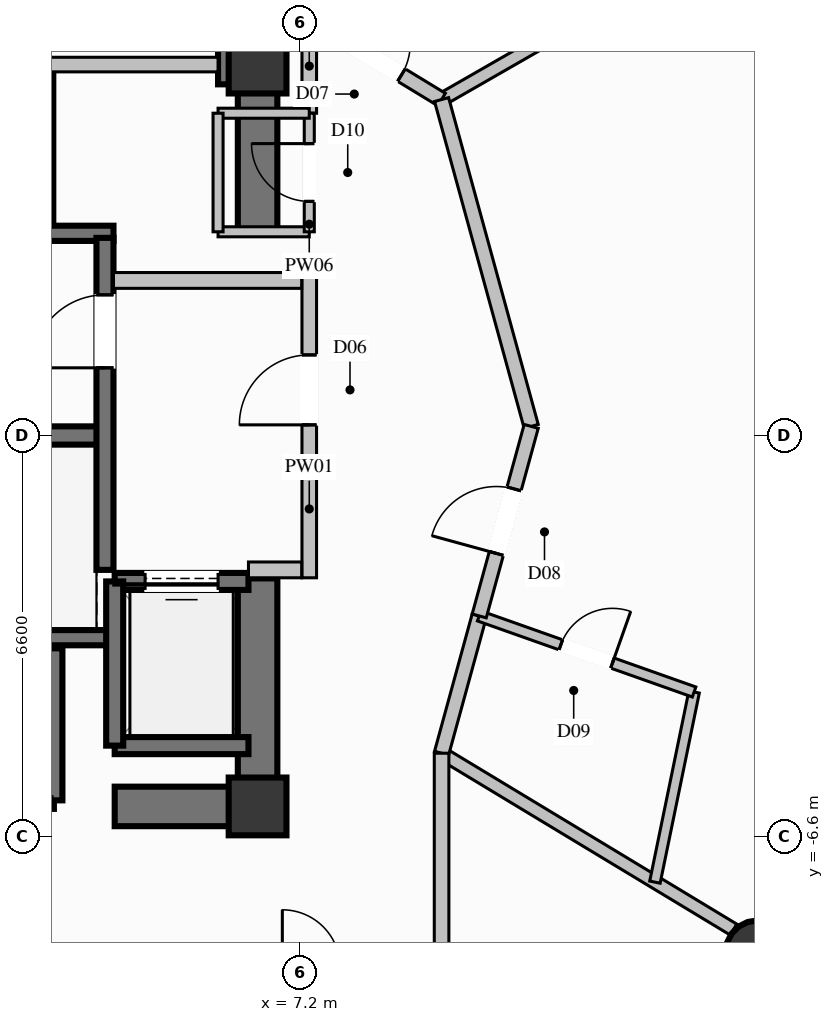
"""IFC4 building model, lengths in metres.
Left out: names, types, materials, properties, quantities, classifications, styles, units other than length and angle.
Written with IfcOpenShell. Run it as: python <this file> out.ifc"""

import sys

from ifc_helpers import new_model, si_unit, direction, frame, frame_2d, origin, origin_2d, place, context, subcontext, project, spatial, rectangle, circle, extrude, element, fill, save


model = new_model("IFC4")
c1 = context("Model", 3, precision=1e-05, world=origin(), true_north=direction((0.0, 1.0)))
c2 = subcontext(c1, "Body", "Model", "MODEL_VIEW")
j1 = project(units=[si_unit("LENGTHUNIT", "METRE"), si_unit("PLANEANGLEUNIT", "RADIAN")], contexts=[c1])
p1 = place(None, origin())
s1 = spatial("IfcSite", under=j1, at=p1, CompositionType="ELEMENT")
p2 = place(p1, origin())
s2 = spatial("IfcBuilding", under=s1, at=p2, CompositionType="ELEMENT")
p3 = place(p2, frame((0.0, 0.0, 113.4)))
s3 = spatial("IfcBuildingStorey", under=s2, at=p3, CompositionType="ELEMENT", Elevation=113.4)
for number, where, z_axis, x_axis in (
    (1, (6.5, -6.1, 0.0), (0.0, 0.0, 1.0), (1.0, 0.0, 0.0)),
    (2, (6.5, 6.1, 0.0), (0.0, 0.0, 1.0), (1.0, 0.0, 0.0)),
):
    element("IfcColumn", number, at=place(p3, frame(where, z_axis=z_axis, x_axis=x_axis)), inside=s3, PredefinedType="COLUMN", context=c2, shape_type="SweptSolid", body=[
        extrude(rectangle(XDim=0.95, YDim=0.95, at=origin_2d()), origin(), (0.0, 0.0, 1.0), 3.6),
    ])
p4 = place(p3, frame((-3.99, 0.0, 0.0), z_axis=(0.0, 0.0, 1.0), x_axis=(1.0, 0.0, 0.0)))
e3 = element("IfcWall", 3, at=p4, inside=s3, PredefinedType="SHEAR", context=c2, shape_type="SweptSolid", body=[
    extrude(rectangle(XDim=7.98, YDim=0.3, at=frame_2d((3.99, 0.0))), origin(), (0.0, 0.0, 1.0), 3.6),
])
for number, where, z_axis, x_axis in (
    (4, (-4.13, -3.325, 0.0), (0.0, 0.0, 1.0), (1.0, 0.0, 0.0)),
    (5, (-4.13, 3.325, 0.0), (0.0, 0.0, 1.0), (1.0, 0.0, 0.0)),
):
    element("IfcWall", number, at=place(p3, frame(where, z_axis=z_axis, x_axis=x_axis)), inside=s3, PredefinedType="SOLIDWALL", context=c2, shape_type="SweptSolid", body=[
        extrude(rectangle(XDim=8.26, YDim=0.25, at=frame_2d((4.13, 0.0))), origin(), (0.0, 0.0, 1.0), 3.6),
    ])
p5 = place(p3, frame((4.15, -6.1, 0.0), z_axis=(0.0, 0.0, 1.0), x_axis=(1.0, 0.0, 0.0)))
e6 = element("IfcWall", 6, at=p5, inside=s3, PredefinedType="SHEAR", context=c2, shape_type="SweptSolid", body=[
    extrude(rectangle(XDim=2.025, YDim=0.65, at=frame_2d((1.013, 0.0))), origin(), (0.0, 0.0, 1.0), 3.6),
])
p6 = place(p3, frame((5.85, 6.1, 0.0), z_axis=(0.0, 0.0, 1.0), x_axis=(1.0, 0.0, 0.0)))
e7 = element("IfcWall", 7, at=p6, inside=s3, PredefinedType="SHEAR", context=c2, shape_type="SweptSolid", body=[
    extrude(rectangle(XDim=0.325, YDim=0.65, at=frame_2d((0.163, 0.0))), origin(), (0.0, 0.0, 1.0), 3.6),
])
p7 = place(p3, frame((6.5, -6.425, 0.0), z_axis=(0.0, 0.0, 1.0), x_axis=(0.0, 1.0, 0.0)))
e8 = element("IfcWall", 8, at=p7, inside=s3, PredefinedType="SHEAR", context=c2, shape_type="SweptSolid", body=[
    extrude(rectangle(XDim=4.075, YDim=0.65, at=frame_2d((2.038, 0.0))), origin(), (0.0, 0.0, 1.0), 3.6),
])
p8 = place(p3, frame((6.5, 3.35, 0.0), z_axis=(0.0, 0.0, 1.0), x_axis=(0.0, 1.0, 0.0)))
e9 = element("IfcWall", 9, at=p8, inside=s3, PredefinedType="SHEAR", context=c2, shape_type="SweptSolid", body=[
    extrude(rectangle(XDim=3.075, YDim=0.65, at=frame_2d((1.538, 0.0))), origin(), (0.0, 0.0, 1.0), 3.6),
])
p9 = place(p3, frame((14.722, -8.5, 0.0), z_axis=(0.0, 0.0, 1.0), x_axis=(1.0, 0.0, 0.0)))
e10 = element("IfcColumn", 10, at=p9, inside=s3, PredefinedType="COLUMN", context=c2, shape_type="SweptSolid", body=[
    extrude(circle(Radius=0.525, at=origin_2d()), origin(), (0.0, 0.0, 1.0), 3.6),
])
p10 = place(p3, frame((1.05, -6.0, 0.0), z_axis=(0.0, 0.0, 1.0), x_axis=(1.0, 0.0, 0.0)))
e11 = element("IfcWall", 11, at=p10, inside=s3, PredefinedType="SOLIDWALL", context=c2, shape_type="SweptSolid", body=[
    extrude(rectangle(XDim=2.1, YDim=0.28, at=frame_2d((1.05, 0.0))), origin(), (0.0, 0.0, 1.0), 3.35),
])
p11 = place(p10, frame((0.5, 0.0, 0.0)))
e12 = element("IfcOpeningElement", 12, at=p11, cuts=e11, PredefinedType="OPENING", context=c2, shape_type="SweptSolid", body=[
    extrude(rectangle(XDim=1.1, YDim=2.2, at=frame_2d((0.55, 1.1))), frame((0.0, 0.15, 0.0), z_axis=(0.0, -1.0, 0.0), x_axis=(1.0, 0.0, 0.0)), (0.0, 0.0, 1.0), 0.3),
])
for number, where, z_axis, x_axis in (
    (13, (3.15, -6.0, 0.0), (0.0, 0.0, 1.0), (0.0, 1.0, 0.0)),
    (14, (3.0, 3.5, 0.0), (0.0, 0.0, 1.0), (0.0, 1.0, 0.0)),
):
    element("IfcWall", number, at=place(p3, frame(where, z_axis=z_axis, x_axis=x_axis)), inside=s3, PredefinedType="SOLIDWALL", context=c2, shape_type="SweptSolid", body=[
        extrude(rectangle(XDim=2.5, YDim=0.28, at=frame_2d((1.25, 0.0))), origin(), (0.0, 0.0, 1.0), 3.35),
    ])
p12 = place(p3, frame((4.15, -5.1, 0.0), z_axis=(0.0, 0.0, 1.0), x_axis=(1.0, 0.0, 0.0)))
e15 = element("IfcWall", 15, at=p12, inside=s3, PredefinedType="SOLIDWALL", context=c2, shape_type="SweptSolid", body=[
    extrude(rectangle(XDim=2.2, YDim=0.28, at=frame_2d((1.1, 0.0))), origin(), (0.0, 0.0, 1.0), 3.35),
])
p13 = place(p3, frame((6.35, -2.4, 0.0), z_axis=(0.0, 0.0, 1.0), x_axis=(-1.0, 0.0, 0.0)))
e16 = element("IfcWall", 16, at=p13, inside=s3, PredefinedType="SOLIDWALL", context=c2, shape_type="SweptSolid", body=[
    extrude(rectangle(XDim=2.2, YDim=0.28, at=frame_2d((1.1, 0.0))), origin(), (0.0, 0.0, 1.0), 3.35),
])
p14 = place(p13, frame((0.5, 0.0, 0.0)))
e17 = element("IfcOpeningElement", 17, at=p14, cuts=e16, PredefinedType="OPENING", context=c2, shape_type="SweptSolid", body=[
    extrude(rectangle(XDim=1.2, YDim=2.2, at=frame_2d((0.6, 1.1))), frame((0.0, 0.15, 0.0), z_axis=(0.0, -1.0, 0.0), x_axis=(1.0, 0.0, 0.0)), (0.0, 0.0, 1.0), 0.3),
])
p15 = place(p3, frame((4.15, -2.4, 0.0), z_axis=(0.0, 0.0, 1.0), x_axis=(0.0, -1.0, 0.0)))
e18 = element("IfcWall", 18, at=p15, inside=s3, PredefinedType="SOLIDWALL", context=c2, shape_type="SweptSolid", body=[
    extrude(rectangle(XDim=2.7, YDim=0.28, at=frame_2d((1.35, 0.0))), origin(), (0.0, 0.0, 1.0), 3.35),
])
p16 = place(p3, frame((3.99, -2.21, 0.0), z_axis=(0.0, 0.0, 1.0), x_axis=(0.0, 1.0, 0.0)))
e19 = element("IfcWall", 19, at=p16, inside=s3, PredefinedType="SOLIDWALL", context=c2, shape_type="SweptSolid", body=[
    extrude(rectangle(XDim=5.46, YDim=0.28, at=frame_2d((2.73, 0.0))), origin(), (0.0, 0.0, 1.0), 3.35),
])
p17 = place(p16, frame((3.323, 0.0, 0.0)))
e20 = element("IfcOpeningElement", 20, at=p17, cuts=e19, PredefinedType="OPENING", context=c2, shape_type="SweptSolid", body=[
    extrude(rectangle(XDim=1.2, YDim=2.2, at=frame_2d((0.6, 1.1))), frame((0.0, 0.15, 0.0), z_axis=(0.0, -1.0, 0.0), x_axis=(1.0, 0.0, 0.0)), (0.0, 0.0, 1.0), 0.3),
])
p18 = place(p3, frame((7.35, -2.34, 0.0), z_axis=(0.0, 0.0, 1.0), x_axis=(0.0, 1.0, 0.0)))
e21 = element("IfcWall", 21, at=p18, inside=s3, PredefinedType="PARTITIONING", context=c2, shape_type="SweptSolid", body=[
    extrude(rectangle(XDim=5.02, YDim=0.24, at=frame_2d((2.51, 0.0))), origin(), (0.0, 0.0, 1.0), 2.435),
])
p19 = place(p18, frame((2.515, 0.0, 0.0)))
e22 = element("IfcOpeningElement", 22, at=p19, cuts=e21, PredefinedType="OPENING", context=c2, shape_type="SweptSolid", body=[
    extrude(rectangle(XDim=1.15, YDim=2.2, at=frame_2d((0.575, 1.1))), frame((0.0, 0.13, 0.0), z_axis=(0.0, -1.0, 0.0), x_axis=(1.0, 0.0, 0.0)), (0.0, 0.0, 1.0), 0.26),
])
p20 = place(p3, frame((6.35, -2.21, 0.0), z_axis=(0.0, 0.0, 1.0), x_axis=(1.0, 0.0, 0.0)))
e23 = element("IfcWall", 23, at=p20, inside=s3, PredefinedType="PARTITIONING", context=c2, shape_type="SweptSolid", body=[
    extrude(rectangle(XDim=0.875, YDim=0.26, at=frame_2d((0.438, 0.0))), origin(), (0.0, 0.0, 1.0), 3.35),
])
p21 = place(p3, frame((4.13, 2.55, 0.0), z_axis=(0.0, 0.0, 1.0), x_axis=(1.0, 0.0, 0.0)))
e24 = element("IfcWall", 24, at=p21, inside=s3, PredefinedType="PARTITIONING", context=c2, shape_type="SweptSolid", body=[
    extrude(rectangle(XDim=3.095, YDim=0.26, at=frame_2d((1.548, 0.0))), origin(), (0.0, 0.0, 1.0), 3.35),
])
p22 = place(p3, frame((7.35, 5.3, 0.0), z_axis=(0.0, 0.0, 1.0), x_axis=(0.0, 1.0, 0.0)))
e25 = element("IfcWall", 25, at=p22, inside=s3, PredefinedType="PARTITIONING", context=c2, shape_type="SweptSolid", body=[
    extrude(rectangle(XDim=1.55, YDim=0.24, at=frame_2d((0.775, 0.0))), origin(), (0.0, 0.0, 1.0), 2.435),
])
p23 = place(p3, frame((3.0, 6.1, 0.0), z_axis=(0.0, 0.0, 1.0), x_axis=(1.0, 0.0, 0.0)))
e26 = element("IfcWall", 26, at=p23, inside=s3, PredefinedType="PARTITIONING", context=c2, shape_type="SweptSolid", body=[
    extrude(rectangle(XDim=2.85, YDim=0.24, at=frame_2d((1.425, 0.0))), origin(), (0.0, 0.0, 1.0), 2.435),
])
p24 = place(p3, frame((5.85, 3.35, 0.0), z_axis=(0.0, 0.0, 1.0), x_axis=(1.0, 0.0, 0.0)))
e27 = element("IfcWall", 27, at=p24, inside=s3, PredefinedType="PARTITIONING", context=c2, shape_type="SweptSolid", body=[
    extrude(rectangle(XDim=1.5, YDim=0.165, at=frame_2d((0.75, 0.0))), origin(), (0.0, 0.0, 1.0), 3.35),
])
p25 = place(p3, frame((7.35, 3.35, 0.0), z_axis=(0.0, 0.0, 1.0), x_axis=(0.0, 1.0, 0.0)))
e28 = element("IfcWall", 28, at=p25, inside=s3, PredefinedType="PARTITIONING", context=c2, shape_type="SweptSolid", body=[
    extrude(rectangle(XDim=1.95, YDim=0.165, at=frame_2d((0.975, 0.0))), origin(), (0.0, 0.0, 1.0), 3.35),
])
p26 = place(p25, frame((0.5, 0.0, 0.0)))
e29 = element("IfcOpeningElement", 29, at=p26, cuts=e28, PredefinedType="OPENING", context=c2, shape_type="SweptSolid", body=[
    extrude(rectangle(XDim=0.95, YDim=2.1, at=frame_2d((0.475, 1.05))), frame((0.0, 0.093, 0.0), z_axis=(0.0, -1.0, 0.0), x_axis=(1.0, 0.0, 0.0)), (0.0, 0.0, 1.0), 0.185),
])
p27 = place(p3, frame((7.35, 5.3, 0.0), z_axis=(0.0, 0.0, 1.0), x_axis=(-1.0, 0.0, 0.0)))
e30 = element("IfcWall", 30, at=p27, inside=s3, PredefinedType="PARTITIONING", context=c2, shape_type="SweptSolid", body=[
    extrude(rectangle(XDim=1.5, YDim=0.165, at=frame_2d((0.75, 0.0))), origin(), (0.0, 0.0, 1.0), 2.435),
])
p28 = place(p3, frame((5.85, 5.3, 0.0), z_axis=(0.0, 0.0, 1.0), x_axis=(0.0, -1.0, 0.0)))
e31 = element("IfcWall", 31, at=p28, inside=s3, PredefinedType="PARTITIONING", context=c2, shape_type="SweptSolid", body=[
    extrude(rectangle(XDim=1.95, YDim=0.165, at=frame_2d((0.975, 0.0))), origin(), (0.0, 0.0, 1.0), 2.435),
])
p29 = place(p3, frame((9.526, 5.525, 0.0), z_axis=(0.0, 0.0, 1.0), x_axis=(0.867314067813, 0.497761295979, 0.0)))
e32 = element("IfcWall", 32, at=p29, inside=s3, PredefinedType="PARTITIONING", context=c2, shape_type="SweptSolid", body=[
    extrude(rectangle(XDim=5.442, YDim=0.21, at=frame_2d((2.721, 0.0))), origin(), (0.0, 0.0, 1.0), 2.718),
])
p30 = place(p3, frame((9.526, -5.225, 0.0), z_axis=(0.0, 0.0, 1.0), x_axis=(0.855972129744, -0.517021965782, 0.0)))
e33 = element("IfcWall", 33, at=p30, inside=s3, PredefinedType="PARTITIONING", context=c2, shape_type="SweptSolid", body=[
    extrude(rectangle(XDim=5.609, YDim=0.21, at=frame_2d((2.804, 0.0))), origin(), (0.0, 0.0, 1.0), 2.718),
])
p31 = place(p3, frame((7.35, 6.85, 0.0), z_axis=(0.0, 0.0, 1.0), x_axis=(0.854057882133, -0.520177982969, 0.0)))
e34 = element("IfcWall", 34, at=p31, inside=s3, PredefinedType="PARTITIONING", context=c2, shape_type="SweptSolid", body=[
    extrude(rectangle(XDim=2.548, YDim=0.24, at=frame_2d((1.274, 0.0))), origin(), (0.0, 0.0, 1.0), 3.35),
])
p32 = place(p31, frame((0.774, 0.0, 0.0)))
e35 = element("IfcOpeningElement", 35, at=p32, cuts=e34, PredefinedType="OPENING", context=c2, shape_type="SweptSolid", body=[
    extrude(rectangle(XDim=1.0, YDim=2.2, at=frame_2d((0.5, 1.1))), frame((0.0, 0.13, 0.0), z_axis=(0.0, -1.0, 0.0), x_axis=(1.0, 0.0, 0.0)), (0.0, 0.0, 1.0), 0.26),
])
p33 = place(p3, frame((9.526, -5.225, 0.0), z_axis=(0.0, 0.0, 1.0), x_axis=(0.264431780812, 0.964404393031, 0.0)))
e36 = element("IfcWall", 36, at=p33, inside=s3, PredefinedType="PARTITIONING", context=c2, shape_type="SweptSolid", body=[
    extrude(rectangle(XDim=2.341, YDim=0.24, at=frame_2d((1.171, 0.0))), origin(), (0.0, 0.0, 1.0), 3.35),
])
p34 = place(p3, frame((13.035, -7.345, 0.0), z_axis=(0.0, 0.0, 1.0), x_axis=(0.201730596841, 0.979441047893, 0.0)))
e37 = element("IfcWall", 37, at=p34, inside=s3, PredefinedType="PLUMBINGWALL", context=c2, shape_type="SweptSolid", body=[
    extrude(rectangle(XDim=3.193, YDim=0.175, at=frame_2d((1.596, 0.0))), origin(), (0.0, 0.0, 1.0), 3.35),
])
p35 = place(p3, frame((10.145, -2.967, 0.0), z_axis=(0.0, 0.0, 1.0), x_axis=(0.94267973016, -0.333698855775, 0.0)))
e38 = element("IfcWall", 38, at=p35, inside=s3, PredefinedType="PLUMBINGWALL", context=c2, shape_type="SweptSolid", body=[
    extrude(rectangle(XDim=3.749, YDim=0.175, at=frame_2d((1.875, 0.0))), origin(), (0.0, 0.0, 1.0), 3.35),
])
p36 = place(p35, frame((1.424, 0.0, 0.0)))
e39 = element("IfcOpeningElement", 39, at=p36, cuts=e38, PredefinedType="OPENING", context=c2, shape_type="SweptSolid", body=[
    extrude(rectangle(XDim=0.9, YDim=2.1, at=frame_2d((0.45, 1.05))), frame((0.0, 0.098, 0.0), z_axis=(0.0, -1.0, 0.0), x_axis=(1.0, 0.0, 0.0)), (0.0, 0.0, 1.0), 0.195),
])
p37 = place(p3, frame((11.0, 0.15, 0.0), z_axis=(0.0, 0.0, 1.0), x_axis=(-0.264488542062, 0.964388827765, 0.0)))
e40 = element("IfcWall", 40, at=p37, inside=s3, PredefinedType="PARTITIONING", context=c2, shape_type="SweptSolid", body=[
    extrude(rectangle(XDim=5.573, YDim=0.24, at=frame_2d((2.787, 0.0))), origin(), (0.0, 0.0, 1.0), 3.35),
])
p38 = place(p3, frame((10.145, -2.967, 0.0), z_axis=(0.0, 0.0, 1.0), x_axis=(0.264529660797, 0.9643775498, 0.0)))
e41 = element("IfcWall", 41, at=p38, inside=s3, PredefinedType="PARTITIONING", context=c2, shape_type="SweptSolid", body=[
    extrude(rectangle(XDim=3.232, YDim=0.24, at=frame_2d((1.616, 0.0))), origin(), (0.0, 0.0, 1.0), 3.35),
])
p39 = place(p38, frame((1.066, 0.0, 0.0)))
e42 = element("IfcOpeningElement", 42, at=p39, cuts=e41, PredefinedType="OPENING", context=c2, shape_type="SweptSolid", body=[
    extrude(rectangle(XDim=1.1, YDim=2.3, at=frame_2d((0.55, 1.15))), frame((0.0, 0.13, 0.0), z_axis=(0.0, -1.0, 0.0), x_axis=(1.0, 0.0, 0.0)), (0.0, 0.0, 1.0), 0.26),
])
p40 = place(p3, frame((9.526, -8.75, 0.0), z_axis=(0.0, 0.0, 1.0), x_axis=(0.0, 1.0, 0.0)))
e43 = element("IfcWall", 43, at=p40, inside=s3, PredefinedType="PARTITIONING", context=c2, shape_type="SweptSolid", body=[
    extrude(rectangle(XDim=3.525, YDim=0.24, at=frame_2d((1.762, 0.0))), origin(), (0.0, 0.0, 1.0), 3.35),
])
p41 = place(p14, origin())
e44 = element("IfcDoor", 44, at=p41, inside=s3, OperationType="SLIDING_TO_LEFT", PredefinedType="DOOR", context=c2, shape_type="SweptSolid", body=[
    extrude(rectangle(XDim=1.2, YDim=2.2, at=frame_2d((0.6, 1.1))), frame((0.0, 0.025, 0.0), z_axis=(0.0, -1.0, 0.0), x_axis=(1.0, 0.0, 0.0)), (0.0, 0.0, 1.0), 0.05),
])
fill(e17, e44)
p42 = place(p17, origin())
e45 = element("IfcDoor", 45, at=p42, inside=s3, OperationType="SINGLE_SWING_LEFT", PredefinedType="DOOR", context=c2, shape_type="SweptSolid", body=[
    extrude(rectangle(XDim=1.2, YDim=2.2, at=frame_2d((0.6, 1.1))), frame((0.0, 0.025, 0.0), z_axis=(0.0, -1.0, 0.0), x_axis=(1.0, 0.0, 0.0)), (0.0, 0.0, 1.0), 0.05),
])
fill(e20, e45)
p43 = place(p19, origin())
e46 = element("IfcDoor", 46, at=p43, inside=s3, OperationType="SINGLE_SWING_LEFT", PredefinedType="DOOR", context=c2, shape_type="SweptSolid", body=[
    extrude(rectangle(XDim=1.15, YDim=2.2, at=frame_2d((0.575, 1.1))), frame((0.0, 0.025, 0.0), z_axis=(0.0, -1.0, 0.0), x_axis=(1.0, 0.0, 0.0)), (0.0, 0.0, 1.0), 0.05),
])
fill(e22, e46)
p44 = place(p26, origin())
e47 = element("IfcDoor", 47, at=p44, inside=s3, OperationType="SINGLE_SWING_RIGHT", PredefinedType="DOOR", context=c2, shape_type="SweptSolid", body=[
    extrude(rectangle(XDim=0.95, YDim=2.1, at=frame_2d((0.475, 1.05))), frame((0.0, 0.025, 0.0), z_axis=(0.0, -1.0, 0.0), x_axis=(1.0, 0.0, 0.0)), (0.0, 0.0, 1.0), 0.05),
])
fill(e29, e47)
p45 = place(p32, origin())
e48 = element("IfcDoor", 48, at=p45, inside=s3, OperationType="SINGLE_SWING_LEFT", PredefinedType="DOOR", context=c2, shape_type="SweptSolid", body=[
    extrude(rectangle(XDim=1.0, YDim=2.2, at=frame_2d((0.5, 1.1))), frame((0.0, 0.025, 0.0), z_axis=(0.0, -1.0, 0.0), x_axis=(1.0, 0.0, 0.0)), (0.0, 0.0, 1.0), 0.05),
])
fill(e35, e48)
p46 = place(p36, origin())
e49 = element("IfcDoor", 49, at=p46, inside=s3, OperationType="SINGLE_SWING_RIGHT", PredefinedType="DOOR", context=c2, shape_type="SweptSolid", body=[
    extrude(rectangle(XDim=0.9, YDim=2.1, at=frame_2d((0.45, 1.05))), frame((0.0, 0.025, 0.0), z_axis=(0.0, -1.0, 0.0), x_axis=(1.0, 0.0, 0.0)), (0.0, 0.0, 1.0), 0.05),
])
fill(e39, e49)
p47 = place(p39, origin())
e50 = element("IfcDoor", 50, at=p47, inside=s3, OperationType="SINGLE_SWING_LEFT", PredefinedType="DOOR", context=c2, shape_type="SweptSolid", body=[
    extrude(rectangle(XDim=1.1, YDim=2.3, at=frame_2d((0.55, 1.15))), frame((0.0, 0.025, 0.0), z_axis=(0.0, -1.0, 0.0), x_axis=(1.0, 0.0, 0.0)), (0.0, 0.0, 1.0), 0.05),
])
fill(e42, e50)
save(model, sys.argv[1])
